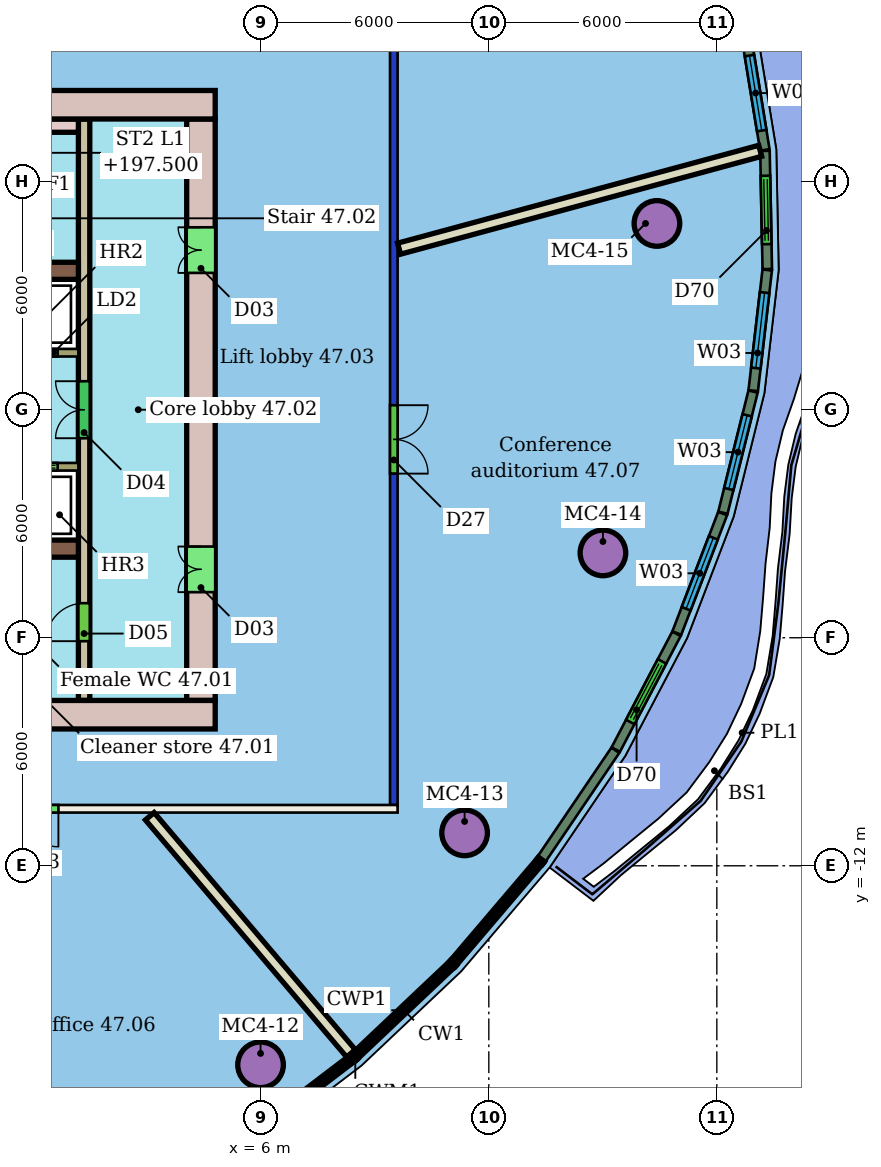
"""IFC4 building model, lengths in metres.
Left out: names, types, materials, properties, quantities, classifications, styles, units other than length and angle.
Written with IfcOpenShell. Run it as: python <this file> out.ifc"""

import sys

from ifc_helpers import new_model, si_unit, direction, frame, frame_2d, origin, origin_2d, place, context, subcontext, project, spatial, rectangle, hollow_circle, extrude, element, fill, save


model = new_model("IFC4")
c1 = context("Model", 3, precision=1e-05, world=origin(), true_north=direction((0.0, 1.0)))
c2 = subcontext(c1, "Body", "Model", "MODEL_VIEW")
j1 = project(units=[si_unit("LENGTHUNIT", "METRE"), si_unit("PLANEANGLEUNIT", "RADIAN")], contexts=[c1])
p1 = place(None, origin())
s1 = spatial("IfcSite", under=j1, at=p1, CompositionType="ELEMENT")
p2 = place(p1, origin())
s2 = spatial("IfcBuilding", under=s1, at=p2, CompositionType="ELEMENT")
p3 = place(p2, frame((0.0, 0.0, 195.7)))
s3 = spatial("IfcBuildingStorey", under=s2, at=p3, CompositionType="ELEMENT", Elevation=195.7)
for number, where, z_axis, x_axis in (
    (1, (5.993, -17.237, 0.0), (0.0, 0.0, 1.0), (1.0, 0.0, 0.0)),
    (2, (11.363, -11.134, 0.0), (0.0, 0.0, 1.0), (1.0, 0.0, 0.0)),
    (3, (15.003, -3.768, 0.0), (0.0, 0.0, 1.0), (1.0, 0.0, 0.0)),
    (4, (16.424, 4.901, 0.0), (0.0, 0.0, 1.0), (1.0, 0.0, 0.0)),
):
    element("IfcColumn", number, at=place(p3, frame(where, z_axis=z_axis, x_axis=x_axis)), inside=s3, PredefinedType="COLUMN", context=c2, shape_type="SweptSolid", body=[
        extrude(hollow_circle(Radius=0.6, WallThickness=0.045, at=origin_2d()), origin(), (0.0, 0.0, 1.0), 3.45),
    ])
p4 = place(p3, frame((9.6, -10.5, 0.0), z_axis=(0.0, 0.0, 1.0), x_axis=(-1.0, 0.0, 0.0)))
e5 = element("IfcWall", 5, at=p4, inside=s3, PredefinedType="PARTITIONING", context=c2, shape_type="SweptSolid", body=[
    extrude(rectangle(XDim=31.2, YDim=0.2, at=frame_2d((15.6, 0.0))), origin(), (0.0, 0.0, 1.0), 3.45),
])
p5 = place(p4, frame((22.273, 0.0, 0.0)))
e6 = element("IfcOpeningElement", 6, at=p5, cuts=e5, PredefinedType="OPENING", context=c2, shape_type="SweptSolid", body=[
    extrude(rectangle(XDim=1.8, YDim=2.1, at=frame_2d((0.9, 1.05))), frame((0.0, 0.11, 0.0), z_axis=(0.0, -1.0, 0.0), x_axis=(1.0, 0.0, 0.0)), (0.0, 0.0, 1.0), 0.22),
])
p6 = place(p4, frame((16.826, 0.0, 0.0)))
e7 = element("IfcOpeningElement", 7, at=p6, cuts=e5, PredefinedType="OPENING", context=c2, shape_type="SweptSolid", body=[
    extrude(rectangle(XDim=1.0, YDim=2.4, at=frame_2d((0.5, 1.2))), frame((0.0, 0.11, 0.0), z_axis=(0.0, -1.0, 0.0), x_axis=(1.0, 0.0, 0.0)), (0.0, 0.0, 1.0), 0.22),
])
p7 = place(p4, frame((8.926, 0.0, 0.0)))
e8 = element("IfcOpeningElement", 8, at=p7, cuts=e5, PredefinedType="OPENING", context=c2, shape_type="SweptSolid", body=[
    extrude(rectangle(XDim=1.0, YDim=2.4, at=frame_2d((0.5, 1.2))), frame((0.0, 0.11, 0.0), z_axis=(0.0, -1.0, 0.0), x_axis=(1.0, 0.0, 0.0)), (0.0, 0.0, 1.0), 0.22),
])
p8 = place(p3, frame((9.5, 10.4, 0.0), z_axis=(0.0, 0.0, 1.0), x_axis=(0.0, -1.0, 0.0)))
e9 = element("IfcWall", 9, at=p8, inside=s3, PredefinedType="PARTITIONING", context=c2, shape_type="SweptSolid", body=[
    extrude(rectangle(XDim=20.8, YDim=0.2, at=frame_2d((10.4, 0.0))), origin(), (0.0, 0.0, 1.0), 3.05),
])
p9 = place(p8, frame((10.281, 0.0, 0.0)))
e10 = element("IfcOpeningElement", 10, at=p9, cuts=e9, PredefinedType="OPENING", context=c2, shape_type="SweptSolid", body=[
    extrude(rectangle(XDim=1.8, YDim=2.4, at=frame_2d((0.9, 1.2))), frame((0.0, 0.11, 0.0), z_axis=(0.0, -1.0, 0.0), x_axis=(1.0, 0.0, 0.0)), (0.0, 0.0, 1.0), 0.22),
])
p10 = place(p3, frame((8.373, -16.936, 0.0), z_axis=(0.0, 0.0, 1.0), x_axis=(-0.647061027519, 0.762438211704, 0.0)))
e11 = element("IfcWall", 11, at=p10, inside=s3, PredefinedType="PARTITIONING", context=c2, shape_type="SweptSolid", body=[
    extrude(rectangle(XDim=8.183, YDim=0.3, at=frame_2d((4.091, 0.0))), origin(), (0.0, 0.0, 1.0), 3.45),
])
p11 = place(p3, frame((19.141, 6.812, 0.0), z_axis=(0.0, 0.0, 1.0), x_axis=(-0.965195730249, -0.26152858794, 0.0)))
e12 = element("IfcWall", 12, at=p11, inside=s3, PredefinedType="PARTITIONING", context=c2, shape_type="SweptSolid", body=[
    extrude(rectangle(XDim=9.845, YDim=0.3, at=frame_2d((4.922, 0.0))), origin(), (0.0, 0.0, 1.0), 3.45),
])
p12 = place(p3, frame((13.392, -11.818, 0.0), z_axis=(0.0, 0.0, 1.0), x_axis=(0.561162409818, 0.827705714495, 0.0)))
e13 = element("IfcWall", 13, at=p12, inside=s3, PredefinedType="SOLIDWALL", context=c2, shape_type="SweptSolid", body=[
    extrude(rectangle(XDim=3.452, YDim=0.25, at=frame_2d((1.726, 0.0))), origin(), (0.0, 0.0, 1.0), 3.1),
])
p13 = place(p3, frame((15.341, -8.941, 0.0), z_axis=(0.0, 0.0, 1.0), x_axis=(0.464508293803, 0.885568769203, 0.0)))
e14 = element("IfcWall", 14, at=p13, inside=s3, PredefinedType="SOLIDWALL", context=c2, shape_type="SweptSolid", body=[
    extrude(rectangle(XDim=3.439, YDim=0.25, at=frame_2d((1.719, 0.0))), origin(), (0.0, 0.0, 1.0), 3.1),
])
p14 = place(p13, frame((0.819, 0.0, 0.0)))
e15 = element("IfcOpeningElement", 15, at=p14, cuts=e14, PredefinedType="OPENING", context=c2, shape_type="SweptSolid", body=[
    extrude(rectangle(XDim=1.8, YDim=2.4, at=frame_2d((0.9, 1.2))), frame((0.0, 0.135, 0.0), z_axis=(0.0, -1.0, 0.0), x_axis=(1.0, 0.0, 0.0)), (0.0, 0.0, 1.0), 0.27),
])
p15 = place(p3, frame((16.948, -5.875, 0.0), z_axis=(0.0, 0.0, 1.0), x_axis=(0.358011880991, 0.933717030513, 0.0)))
e16 = element("IfcWall", 16, at=p15, inside=s3, PredefinedType="SOLIDWALL", context=c2, shape_type="SweptSolid", body=[
    extrude(rectangle(XDim=3.367, YDim=0.25, at=frame_2d((1.683, 0.0))), origin(), (0.0, 0.0, 1.0), 3.1),
])
p16 = place(p15, frame((0.683, 0.0, 0.9)))
e17 = element("IfcOpeningElement", 17, at=p16, cuts=e16, PredefinedType="OPENING", context=c2, shape_type="SweptSolid", body=[
    extrude(rectangle(XDim=2.0, YDim=2.1, at=frame_2d((1.0, 1.05))), frame((0.0, 0.135, 0.0), z_axis=(0.0, -1.0, 0.0), x_axis=(1.0, 0.0, 0.0)), (0.0, 0.0, 1.0), 0.27),
])
p17 = place(p3, frame((18.16, -2.71, 0.0), z_axis=(0.0, 0.0, 1.0), x_axis=(0.241591009496, 0.970378165527, 0.0)))
e18 = element("IfcWall", 18, at=p17, inside=s3, PredefinedType="SOLIDWALL", context=c2, shape_type="SweptSolid", body=[
    extrude(rectangle(XDim=3.284, YDim=0.25, at=frame_2d((1.642, 0.0))), origin(), (0.0, 0.0, 1.0), 3.1),
])
p18 = place(p17, frame((0.642, 0.0, 0.9)))
e19 = element("IfcOpeningElement", 19, at=p18, cuts=e18, PredefinedType="OPENING", context=c2, shape_type="SweptSolid", body=[
    extrude(rectangle(XDim=2.0, YDim=2.1, at=frame_2d((1.0, 1.05))), frame((0.0, 0.135, 0.0), z_axis=(0.0, -1.0, 0.0), x_axis=(1.0, 0.0, 0.0)), (0.0, 0.0, 1.0), 0.27),
])
p19 = place(p3, frame((18.958, 0.501, 0.0), z_axis=(0.0, 0.0, 1.0), x_axis=(0.115316862034, 0.99332875793, 0.0)))
e20 = element("IfcWall", 20, at=p19, inside=s3, PredefinedType="SOLIDWALL", context=c2, shape_type="SweptSolid", body=[
    extrude(rectangle(XDim=3.197, YDim=0.25, at=frame_2d((1.598, 0.0))), origin(), (0.0, 0.0, 1.0), 3.1),
])
p20 = place(p19, frame((0.598, 0.0, 0.9)))
e21 = element("IfcOpeningElement", 21, at=p20, cuts=e20, PredefinedType="OPENING", context=c2, shape_type="SweptSolid", body=[
    extrude(rectangle(XDim=2.0, YDim=2.1, at=frame_2d((1.0, 1.05))), frame((0.0, 0.135, 0.0), z_axis=(0.0, -1.0, 0.0), x_axis=(1.0, 0.0, 0.0)), (0.0, 0.0, 1.0), 0.27),
])
p21 = place(p3, frame((19.327, 3.701, 0.0), z_axis=(0.0, 0.0, 1.0), x_axis=(-0.01970563503, 0.999805825122, 0.0)))
e22 = element("IfcWall", 22, at=p21, inside=s3, PredefinedType="SOLIDWALL", context=c2, shape_type="SweptSolid", body=[
    extrude(rectangle(XDim=3.11, YDim=0.25, at=frame_2d((1.555, 0.0))), origin(), (0.0, 0.0, 1.0), 3.1),
])
p22 = place(p21, frame((0.655, 0.0, 0.0)))
e23 = element("IfcOpeningElement", 23, at=p22, cuts=e22, PredefinedType="OPENING", context=c2, shape_type="SweptSolid", body=[
    extrude(rectangle(XDim=1.8, YDim=2.4, at=frame_2d((0.9, 1.2))), frame((0.0, 0.135, 0.0), z_axis=(0.0, -1.0, 0.0), x_axis=(1.0, 0.0, 0.0)), (0.0, 0.0, 1.0), 0.27),
])
p23 = place(p3, frame((19.264, 6.836, 0.0), z_axis=(0.0, 0.0, 1.0), x_axis=(-0.161248834654, 0.986913782112, 0.0)))
e24 = element("IfcWall", 24, at=p23, inside=s3, PredefinedType="SOLIDWALL", context=c2, shape_type="SweptSolid", body=[
    extrude(rectangle(XDim=3.03, YDim=0.25, at=frame_2d((1.515, 0.0))), origin(), (0.0, 0.0, 1.0), 3.1),
])
p24 = place(p23, frame((0.515, 0.0, 0.9)))
e25 = element("IfcOpeningElement", 25, at=p24, cuts=e24, PredefinedType="OPENING", context=c2, shape_type="SweptSolid", body=[
    extrude(rectangle(XDim=2.0, YDim=2.1, at=frame_2d((1.0, 1.05))), frame((0.0, 0.135, 0.0), z_axis=(0.0, -1.0, 0.0), x_axis=(1.0, 0.0, 0.0)), (0.0, 0.0, 1.0), 0.27),
])
p25 = place(p3, frame((4.8, 8.025, 0.0), z_axis=(0.0, 0.0, 1.0), x_axis=(-1.0, 0.0, 0.0)))
e26 = element("IfcWall", 26, at=p25, inside=s3, PredefinedType="SHEAR", context=c2, shape_type="SweptSolid", body=[
    extrude(rectangle(XDim=10.8, YDim=0.75, at=frame_2d((5.4, 0.0))), origin(), (0.0, 0.0, 1.0), 3.3),
])
p26 = place(p25, frame((4.4, 0.0, 0.0)))
e27 = element("IfcOpeningElement", 27, at=p26, cuts=e26, PredefinedType="OPENING", context=c2, shape_type="SweptSolid", body=[
    extrude(rectangle(XDim=1.2, YDim=2.1, at=frame_2d((0.6, 1.05))), frame((0.0, 0.385, 0.0), z_axis=(0.0, -1.0, 0.0), x_axis=(1.0, 0.0, 0.0)), (0.0, 0.0, 1.0), 0.77),
])
p27 = place(p3, frame((-16.8, -8.025, 0.0), z_axis=(0.0, 0.0, 1.0), x_axis=(1.0, 0.0, 0.0)))
e28 = element("IfcWall", 28, at=p27, inside=s3, PredefinedType="SHEAR", context=c2, shape_type="SweptSolid", body=[
    extrude(rectangle(XDim=21.6, YDim=0.75, at=frame_2d((10.8, 0.0))), origin(), (0.0, 0.0, 1.0), 3.3),
])
p28 = place(p27, frame((4.8, 0.0, 0.0)))
e29 = element("IfcOpeningElement", 29, at=p28, cuts=e28, PredefinedType="OPENING", context=c2, shape_type="SweptSolid", body=[
    extrude(rectangle(XDim=1.2, YDim=2.1, at=frame_2d((0.6, 1.05))), frame((0.0, 0.385, 0.0), z_axis=(0.0, -1.0, 0.0), x_axis=(1.0, 0.0, 0.0)), (0.0, 0.0, 1.0), 0.77),
])
p29 = place(p3, frame((4.425, -7.65, 0.0), z_axis=(0.0, 0.0, 1.0), x_axis=(0.0, 1.0, 0.0)))
e30 = element("IfcWall", 30, at=p29, inside=s3, PredefinedType="SHEAR", context=c2, shape_type="SweptSolid", body=[
    extrude(rectangle(XDim=15.3, YDim=0.75, at=frame_2d((7.65, 0.0))), origin(), (0.0, 0.0, 1.0), 3.3),
])
p30 = place(p29, frame((2.85, 0.0, 0.0)))
e31 = element("IfcOpeningElement", 31, at=p30, cuts=e30, PredefinedType="OPENING", context=c2, shape_type="SweptSolid", body=[
    extrude(rectangle(XDim=1.2, YDim=2.1, at=frame_2d((0.6, 1.05))), frame((0.0, 0.385, 0.0), z_axis=(0.0, -1.0, 0.0), x_axis=(1.0, 0.0, 0.0)), (0.0, 0.0, 1.0), 0.77),
])
p31 = place(p29, frame((11.25, 0.0, 0.0)))
e32 = element("IfcOpeningElement", 32, at=p31, cuts=e30, PredefinedType="OPENING", context=c2, shape_type="SweptSolid", body=[
    extrude(rectangle(XDim=1.2, YDim=2.1, at=frame_2d((0.6, 1.05))), frame((0.0, 0.385, 0.0), z_axis=(0.0, -1.0, 0.0), x_axis=(1.0, 0.0, 0.0)), (0.0, 0.0, 1.0), 0.77),
])
for number, where, z_axis, x_axis in (
    (33, (-6.0, 3.655, 0.0), (0.0, 0.0, 1.0), (1.0, 0.0, 0.0)),
    (34, (-6.0, -3.655, 0.0), (0.0, 0.0, 1.0), (1.0, 0.0, 0.0)),
):
    element("IfcWall", number, at=place(p3, frame(where, z_axis=z_axis, x_axis=x_axis)), inside=s3, PredefinedType="SHEAR", context=c2, shape_type="SweptSolid", body=[
        extrude(rectangle(XDim=7.2, YDim=0.45, at=frame_2d((3.6, 0.0))), origin(), (0.0, 0.0, 1.0), 3.3),
    ])
p32 = place(p3, frame((1.35, -7.65, 0.0), z_axis=(0.0, 0.0, 1.0), x_axis=(0.0, 1.0, 0.0)))
e35 = element("IfcWall", 35, at=p32, inside=s3, PredefinedType="SHEAR", context=c2, shape_type="SweptSolid", body=[
    extrude(rectangle(XDim=15.3, YDim=0.3, at=frame_2d((7.65, 0.0))), origin(), (0.0, 0.0, 1.0), 3.3),
])
p33 = place(p32, frame((1.56, 0.0, 0.0)))
e36 = element("IfcOpeningElement", 36, at=p33, cuts=e35, PredefinedType="OPENING", context=c2, shape_type="SweptSolid", body=[
    extrude(rectangle(XDim=1.0, YDim=2.1, at=frame_2d((0.5, 1.05))), frame((0.0, 0.16, 0.0), z_axis=(0.0, -1.0, 0.0), x_axis=(1.0, 0.0, 0.0)), (0.0, 0.0, 1.0), 0.32),
])
p34 = place(p32, frame((6.9, 0.0, 0.0)))
e37 = element("IfcOpeningElement", 37, at=p34, cuts=e35, PredefinedType="OPENING", context=c2, shape_type="SweptSolid", body=[
    extrude(rectangle(XDim=1.5, YDim=2.1, at=frame_2d((0.75, 1.05))), frame((0.0, 0.16, 0.0), z_axis=(0.0, -1.0, 0.0), x_axis=(1.0, 0.0, 0.0)), (0.0, 0.0, 1.0), 0.32),
])
p35 = place(p3, frame((-13.2, 1.5, 0.0), z_axis=(0.0, 0.0, 1.0), x_axis=(1.0, 0.0, 0.0)))
e38 = element("IfcWall", 38, at=p35, inside=s3, PredefinedType="SHEAR", context=c2, shape_type="SweptSolid", body=[
    extrude(rectangle(XDim=14.4, YDim=0.2, at=frame_2d((7.2, 0.0))), origin(), (0.0, 0.0, 1.0), 3.3),
])
p36 = place(p35, frame((10.312, 0.0, 0.0)))
e39 = element("IfcOpeningElement", 39, at=p36, cuts=e38, PredefinedType="OPENING", context=c2, shape_type="SweptSolid", body=[
    extrude(rectangle(XDim=1.1, YDim=2.1, at=frame_2d((0.55, 1.05))), frame((0.0, 0.11, 0.0), z_axis=(0.0, -1.0, 0.0), x_axis=(1.0, 0.0, 0.0)), (0.0, 0.0, 1.0), 0.22),
])
p37 = place(p35, frame((12.754, 0.0, 0.0)))
e40 = element("IfcOpeningElement", 40, at=p37, cuts=e38, PredefinedType="OPENING", context=c2, shape_type="SweptSolid", body=[
    extrude(rectangle(XDim=1.1, YDim=2.1, at=frame_2d((0.55, 1.05))), frame((0.0, 0.11, 0.0), z_axis=(0.0, -1.0, 0.0), x_axis=(1.0, 0.0, 0.0)), (0.0, 0.0, 1.0), 0.22),
])
p38 = place(p35, frame((0.15, 0.0, 0.0)))
e41 = element("IfcOpeningElement", 41, at=p38, cuts=e38, PredefinedType="OPENING", context=c2, shape_type="SweptSolid", body=[
    extrude(rectangle(XDim=0.9, YDim=2.1, at=frame_2d((0.45, 1.05))), frame((0.0, 0.11, 0.0), z_axis=(0.0, -1.0, 0.0), x_axis=(1.0, 0.0, 0.0)), (0.0, 0.0, 1.0), 0.22),
])
p39 = place(p35, frame((4.222, 0.0, 0.0)))
e42 = element("IfcOpeningElement", 42, at=p39, cuts=e38, PredefinedType="OPENING", context=c2, shape_type="SweptSolid", body=[
    extrude(rectangle(XDim=1.0, YDim=2.1, at=frame_2d((0.5, 1.05))), frame((0.0, 0.11, 0.0), z_axis=(0.0, -1.0, 0.0), x_axis=(1.0, 0.0, 0.0)), (0.0, 0.0, 1.0), 0.22),
])
p40 = place(p35, frame((8.367, 0.0, 0.0)))
e43 = element("IfcOpeningElement", 43, at=p40, cuts=e38, PredefinedType="OPENING", context=c2, shape_type="SweptSolid", body=[
    extrude(rectangle(XDim=1.0, YDim=2.1, at=frame_2d((0.5, 1.05))), frame((0.0, 0.11, 0.0), z_axis=(0.0, -1.0, 0.0), x_axis=(1.0, 0.0, 0.0)), (0.0, 0.0, 1.0), 0.22),
])
p41 = place(p3, frame((1.2, -1.5, 0.0), z_axis=(0.0, 0.0, 1.0), x_axis=(-1.0, 0.0, 0.0)))
e44 = element("IfcWall", 44, at=p41, inside=s3, PredefinedType="SHEAR", context=c2, shape_type="SweptSolid", body=[
    extrude(rectangle(XDim=14.4, YDim=0.2, at=frame_2d((7.2, 0.0))), origin(), (0.0, 0.0, 1.0), 3.3),
])
p42 = place(p41, frame((7.821, 0.0, 0.0)))
e45 = element("IfcOpeningElement", 45, at=p42, cuts=e44, PredefinedType="OPENING", context=c2, shape_type="SweptSolid", body=[
    extrude(rectangle(XDim=1.2, YDim=2.1, at=frame_2d((0.6, 1.05))), frame((0.0, 0.11, 0.0), z_axis=(0.0, -1.0, 0.0), x_axis=(1.0, 0.0, 0.0)), (0.0, 0.0, 1.0), 0.22),
])
p43 = place(p41, frame((0.546, 0.0, 0.0)))
e46 = element("IfcOpeningElement", 46, at=p43, cuts=e44, PredefinedType="OPENING", context=c2, shape_type="SweptSolid", body=[
    extrude(rectangle(XDim=1.1, YDim=2.1, at=frame_2d((0.55, 1.05))), frame((0.0, 0.11, 0.0), z_axis=(0.0, -1.0, 0.0), x_axis=(1.0, 0.0, 0.0)), (0.0, 0.0, 1.0), 0.22),
])
p44 = place(p41, frame((2.592, 0.0, 0.0)))
e47 = element("IfcOpeningElement", 47, at=p44, cuts=e44, PredefinedType="OPENING", context=c2, shape_type="SweptSolid", body=[
    extrude(rectangle(XDim=0.9, YDim=2.1, at=frame_2d((0.45, 1.05))), frame((0.0, 0.11, 0.0), z_axis=(0.0, -1.0, 0.0), x_axis=(1.0, 0.0, 0.0)), (0.0, 0.0, 1.0), 0.22),
])
p45 = place(p3, frame((0.4, 7.475, 0.0), z_axis=(0.0, 0.0, 1.0), x_axis=(1.0, 0.0, 0.0)))
e48 = element("IfcWall", 48, at=p45, inside=s3, PredefinedType="SHEAR", context=c2, shape_type="SweptSolid", body=[
    extrude(rectangle(XDim=0.8, YDim=0.35, at=frame_2d((0.4, 0.0))), origin(), (0.0, 0.0, 1.0), 3.3),
])
p46 = place(p7, origin())
e49 = element("IfcDoor", 49, at=p46, inside=s3, OperationType="SINGLE_SWING_LEFT", PredefinedType="DOOR", context=c2, shape_type="SweptSolid", body=[
    extrude(rectangle(XDim=1.0, YDim=2.4, at=frame_2d((0.5, 1.2))), frame((0.0, 0.025, 0.0), z_axis=(0.0, -1.0, 0.0), x_axis=(1.0, 0.0, 0.0)), (0.0, 0.0, 1.0), 0.05),
])
fill(e8, e49)
p47 = place(p9, origin())
e50 = element("IfcDoor", 50, at=p47, inside=s3, OperationType="DOUBLE_DOOR_SINGLE_SWING", PredefinedType="DOOR", context=c2, shape_type="SweptSolid", body=[
    extrude(rectangle(XDim=1.8, YDim=2.4, at=frame_2d((0.9, 1.2))), frame((0.0, 0.025, 0.0), z_axis=(0.0, -1.0, 0.0), x_axis=(1.0, 0.0, 0.0)), (0.0, 0.0, 1.0), 0.05),
])
fill(e10, e50)
p48 = place(p14, origin())
e51 = element("IfcDoor", 51, at=p48, inside=s3, OperationType="DOUBLE_DOOR_SLIDING", PredefinedType="DOOR", context=c2, shape_type="SweptSolid", body=[
    extrude(rectangle(XDim=1.8, YDim=2.4, at=frame_2d((0.9, 1.2))), frame((0.0, 0.025, 0.0), z_axis=(0.0, -1.0, 0.0), x_axis=(1.0, 0.0, 0.0)), (0.0, 0.0, 1.0), 0.05),
])
fill(e15, e51)
p49 = place(p16, origin())
e52 = element("IfcWindow", 52, at=p49, inside=s3, PartitioningType="SINGLE_PANEL", PredefinedType="WINDOW", context=c2, shape_type="SweptSolid", body=[
    extrude(rectangle(XDim=2.0, YDim=2.1, at=frame_2d((1.0, 1.05))), frame((0.0, 0.03, 0.0), z_axis=(0.0, -1.0, 0.0), x_axis=(1.0, 0.0, 0.0)), (0.0, 0.0, 1.0), 0.06),
])
fill(e17, e52)
p50 = place(p18, origin())
e53 = element("IfcWindow", 53, at=p50, inside=s3, PartitioningType="SINGLE_PANEL", PredefinedType="WINDOW", context=c2, shape_type="SweptSolid", body=[
    extrude(rectangle(XDim=2.0, YDim=2.1, at=frame_2d((1.0, 1.05))), frame((0.0, 0.03, 0.0), z_axis=(0.0, -1.0, 0.0), x_axis=(1.0, 0.0, 0.0)), (0.0, 0.0, 1.0), 0.06),
])
fill(e19, e53)
p51 = place(p20, origin())
e54 = element("IfcWindow", 54, at=p51, inside=s3, PartitioningType="SINGLE_PANEL", PredefinedType="WINDOW", context=c2, shape_type="SweptSolid", body=[
    extrude(rectangle(XDim=2.0, YDim=2.1, at=frame_2d((1.0, 1.05))), frame((0.0, 0.03, 0.0), z_axis=(0.0, -1.0, 0.0), x_axis=(1.0, 0.0, 0.0)), (0.0, 0.0, 1.0), 0.06),
])
fill(e21, e54)
p52 = place(p22, origin())
e55 = element("IfcDoor", 55, at=p52, inside=s3, OperationType="DOUBLE_DOOR_SLIDING", PredefinedType="DOOR", context=c2, shape_type="SweptSolid", body=[
    extrude(rectangle(XDim=1.8, YDim=2.4, at=frame_2d((0.9, 1.2))), frame((0.0, 0.025, 0.0), z_axis=(0.0, -1.0, 0.0), x_axis=(1.0, 0.0, 0.0)), (0.0, 0.0, 1.0), 0.05),
])
fill(e23, e55)
p53 = place(p24, origin())
e56 = element("IfcWindow", 56, at=p53, inside=s3, PartitioningType="SINGLE_PANEL", PredefinedType="WINDOW", context=c2, shape_type="SweptSolid", body=[
    extrude(rectangle(XDim=2.0, YDim=2.1, at=frame_2d((1.0, 1.05))), frame((0.0, 0.03, 0.0), z_axis=(0.0, -1.0, 0.0), x_axis=(1.0, 0.0, 0.0)), (0.0, 0.0, 1.0), 0.06),
])
fill(e25, e56)
p54 = place(p30, origin())
e57 = element("IfcDoor", 57, at=p54, inside=s3, OperationType="DOUBLE_DOOR_SINGLE_SWING", PredefinedType="NOTDEFINED", context=c2, shape_type="SweptSolid", body=[
    extrude(rectangle(XDim=1.2, YDim=2.1, at=frame_2d((0.6, 1.05))), frame((0.0, 0.025, 0.0), z_axis=(0.0, -1.0, 0.0), x_axis=(1.0, 0.0, 0.0)), (0.0, 0.0, 1.0), 0.05),
])
fill(e31, e57)
p55 = place(p31, origin())
e58 = element("IfcDoor", 58, at=p55, inside=s3, OperationType="DOUBLE_DOOR_SINGLE_SWING", PredefinedType="NOTDEFINED", context=c2, shape_type="SweptSolid", body=[
    extrude(rectangle(XDim=1.2, YDim=2.1, at=frame_2d((0.6, 1.05))), frame((0.0, 0.025, 0.0), z_axis=(0.0, -1.0, 0.0), x_axis=(1.0, 0.0, 0.0)), (0.0, 0.0, 1.0), 0.05),
])
fill(e32, e58)
p56 = place(p33, origin())
e59 = element("IfcDoor", 59, at=p56, inside=s3, OperationType="SINGLE_SWING_LEFT", PredefinedType="NOTDEFINED", context=c2, shape_type="SweptSolid", body=[
    extrude(rectangle(XDim=1.0, YDim=2.1, at=frame_2d((0.5, 1.05))), frame((0.0, 0.025, 0.0), z_axis=(0.0, -1.0, 0.0), x_axis=(1.0, 0.0, 0.0)), (0.0, 0.0, 1.0), 0.05),
])
fill(e36, e59)
p57 = place(p34, origin())
e60 = element("IfcDoor", 60, at=p57, inside=s3, OperationType="DOUBLE_DOOR_SINGLE_SWING", PredefinedType="NOTDEFINED", context=c2, shape_type="SweptSolid", body=[
    extrude(rectangle(XDim=1.5, YDim=2.1, at=frame_2d((0.75, 1.05))), frame((0.0, 0.025, 0.0), z_axis=(0.0, -1.0, 0.0), x_axis=(1.0, 0.0, 0.0)), (0.0, 0.0, 1.0), 0.05),
])
fill(e37, e60)
p58 = place(p37, origin())
e61 = element("IfcDoor", 61, at=p58, inside=s3, OperationType="DOUBLE_DOOR_SLIDING", PredefinedType="NOTDEFINED", context=c2, shape_type="SweptSolid", body=[
    extrude(rectangle(XDim=1.1, YDim=2.1, at=frame_2d((0.55, 1.05))), frame((0.0, 0.025, 0.0), z_axis=(0.0, -1.0, 0.0), x_axis=(1.0, 0.0, 0.0)), (0.0, 0.0, 1.0), 0.05),
])
fill(e40, e61)
p59 = place(p43, origin())
e62 = element("IfcDoor", 62, at=p59, inside=s3, OperationType="DOUBLE_DOOR_SLIDING", PredefinedType="NOTDEFINED", context=c2, shape_type="SweptSolid", body=[
    extrude(rectangle(XDim=1.1, YDim=2.1, at=frame_2d((0.55, 1.05))), frame((0.0, 0.025, 0.0), z_axis=(0.0, -1.0, 0.0), x_axis=(1.0, 0.0, 0.0)), (0.0, 0.0, 1.0), 0.05),
])
fill(e46, e62)
save(model, sys.argv[1])
